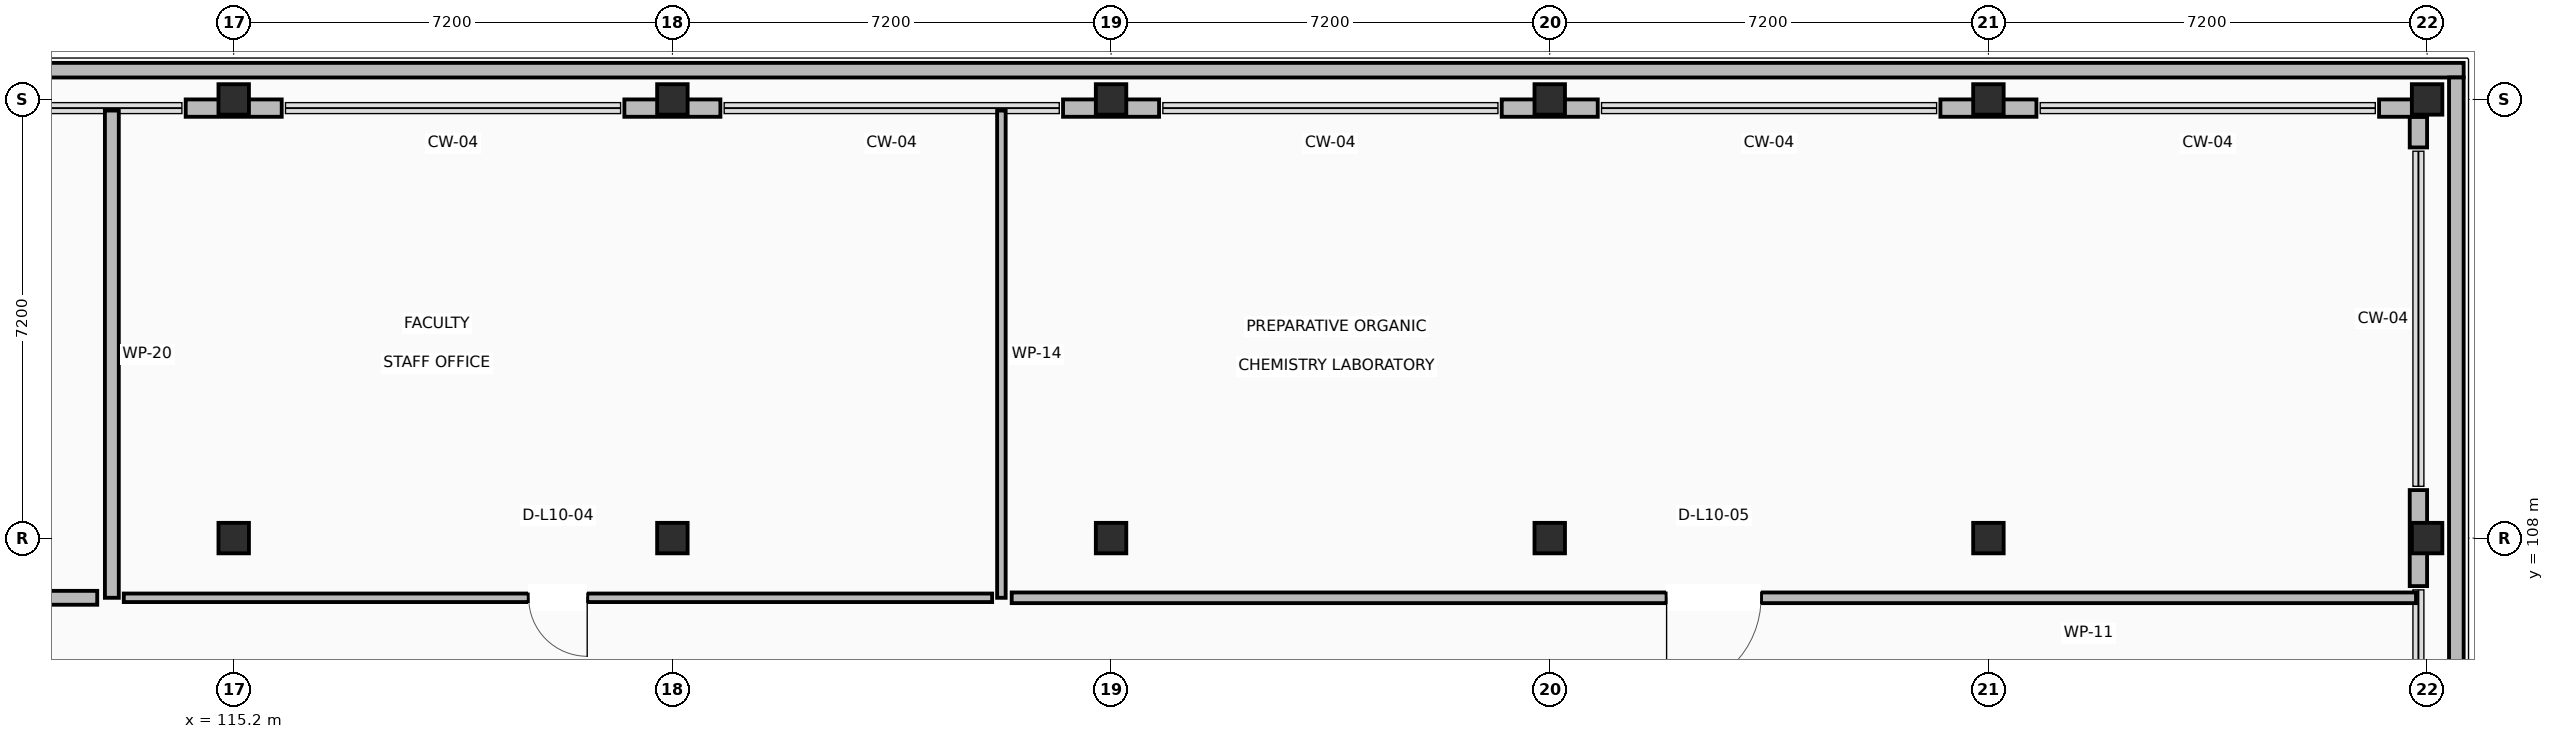
"""IFC4 building model, lengths in metres.
Left out: names, types, materials, properties, quantities, classifications, styles, units other than length and angle.
Written with IfcOpenShell. Run it as: python <this file> out.ifc"""

import sys

from ifc_helpers import new_model, si_unit, direction, frame, frame_2d, origin, origin_2d, place, context, subcontext, project, spatial, rectangle, extrude, element, fill, save


model = new_model("IFC4")
c1 = context("Model", 3, precision=1e-05, world=origin(), true_north=direction((0.0, 1.0)))
c2 = subcontext(c1, "Body", "Model", "MODEL_VIEW")
j1 = project(units=[si_unit("LENGTHUNIT", "METRE"), si_unit("PLANEANGLEUNIT", "RADIAN")], contexts=[c1])
p1 = place(None, origin())
s1 = spatial("IfcSite", under=j1, at=p1, CompositionType="ELEMENT")
p2 = place(p1, origin())
s2 = spatial("IfcBuilding", under=s1, at=p2, CompositionType="ELEMENT")
p3 = place(p2, frame((0.0, 0.0, 43.8)))
s3 = spatial("IfcBuildingStorey", under=s2, at=p3, CompositionType="ELEMENT", Elevation=43.8)
for number, where, z_axis, x_axis in (
    (1, (115.2, 108.0, 0.0), (0.0, 0.0, 1.0), (1.0, 0.0, 0.0)),
    (2, (115.2, 115.2, 0.0), (0.0, 0.0, 1.0), (1.0, 0.0, 0.0)),
    (3, (122.4, 108.0, 0.0), (0.0, 0.0, 1.0), (1.0, 0.0, 0.0)),
    (4, (122.4, 115.2, 0.0), (0.0, 0.0, 1.0), (1.0, 0.0, 0.0)),
    (5, (129.6, 108.0, 0.0), (0.0, 0.0, 1.0), (1.0, 0.0, 0.0)),
    (6, (129.6, 115.2, 0.0), (0.0, 0.0, 1.0), (1.0, 0.0, 0.0)),
    (7, (136.8, 108.0, 0.0), (0.0, 0.0, 1.0), (1.0, 0.0, 0.0)),
    (8, (136.8, 115.2, 0.0), (0.0, 0.0, 1.0), (1.0, 0.0, 0.0)),
    (9, (144.0, 108.0, 0.0), (0.0, 0.0, 1.0), (1.0, 0.0, 0.0)),
    (10, (144.0, 115.2, 0.0), (0.0, 0.0, 1.0), (1.0, 0.0, 0.0)),
    (11, (151.2, 108.0, 0.0), (0.0, 0.0, 1.0), (1.0, 0.0, 0.0)),
    (12, (151.2, 115.2, 0.0), (0.0, 0.0, 1.0), (1.0, 0.0, 0.0)),
):
    element("IfcColumn", number, at=place(p3, frame(where, z_axis=z_axis, x_axis=x_axis)), inside=s3, PredefinedType="COLUMN", context=c2, shape_type="SweptSolid", body=[
        extrude(rectangle(XDim=0.5, YDim=0.5, at=origin_2d()), origin(), (0.0, 0.0, 1.0), 3.92),
    ])
p4 = place(p3, frame((151.058, 107.212, 0.0), z_axis=(0.0, 0.0, 1.0), x_axis=(0.0, 1.0, 0.0)))
e13 = element("IfcWall", 13, at=p4, inside=s3, PredefinedType="STANDARD", context=c2, shape_type="SweptSolid", body=[
    extrude(rectangle(XDim=1.576, YDim=0.285, at=frame_2d((0.788, 0.0))), origin(), (0.0, 0.0, 1.0), 2.96),
])
p5 = place(p3, frame((151.058, 114.412, 0.0), z_axis=(0.0, 0.0, 1.0), x_axis=(0.0, 1.0, 0.0)))
e14 = element("IfcWall", 14, at=p5, inside=s3, PredefinedType="STANDARD", context=c2, shape_type="SweptSolid", body=[
    extrude(rectangle(XDim=0.503, YDim=0.285, at=frame_2d((0.251, 0.0))), origin(), (0.0, 0.0, 1.0), 2.96),
])
p6 = place(p3, frame((151.2, 115.058, 0.0), z_axis=(0.0, 0.0, 1.0), x_axis=(-1.0, 0.0, 0.0)))
e15 = element("IfcWall", 15, at=p6, inside=s3, PredefinedType="STANDARD", context=c2, shape_type="SweptSolid", body=[
    extrude(rectangle(XDim=0.788, YDim=0.285, at=frame_2d((0.394, 0.0))), origin(), (0.0, 0.0, 1.0), 2.96),
])
p7 = place(p3, frame((144.788, 115.058, 0.0), z_axis=(0.0, 0.0, 1.0), x_axis=(-1.0, 0.0, 0.0)))
e16 = element("IfcWall", 16, at=p7, inside=s3, PredefinedType="STANDARD", context=c2, shape_type="SweptSolid", body=[
    extrude(rectangle(XDim=1.576, YDim=0.285, at=frame_2d((0.788, 0.0))), origin(), (0.0, 0.0, 1.0), 2.96),
])
for number, where, z_axis, x_axis in (
    (17, (137.588, 115.058, 0.0), (0.0, 0.0, 1.0), (-1.0, 0.0, 0.0)),
    (18, (130.388, 115.058, 0.0), (0.0, 0.0, 1.0), (-1.0, 0.0, 0.0)),
    (19, (123.188, 115.058, 0.0), (0.0, 0.0, 1.0), (-1.0, 0.0, 0.0)),
    (20, (115.988, 115.058, 0.0), (0.0, 0.0, 1.0), (-1.0, 0.0, 0.0)),
):
    element("IfcWall", number, at=place(p3, frame(where, z_axis=z_axis, x_axis=x_axis)), inside=s3, PredefinedType="STANDARD", context=c2, shape_type="SweptSolid", body=[
        extrude(rectangle(XDim=1.576, YDim=0.285, at=frame_2d((0.788, 0.0))), origin(), (0.0, 0.0, 1.0), 2.96),
    ])
p8 = place(p3, frame((93.0, 115.68, 0.0), z_axis=(0.0, 0.0, 1.0), x_axis=(1.0, 0.0, 0.0)))
e21 = element("IfcWall", 21, at=p8, inside=s3, PredefinedType="PARAPET", context=c2, shape_type="SweptSolid", body=[
    extrude(rectangle(XDim=58.8, YDim=0.24, at=frame_2d((29.4, 0.0))), origin(), (0.0, 0.0, 1.0), 1.12),
])
p9 = place(p3, frame((151.68, 115.56, 0.0), z_axis=(0.0, 0.0, 1.0), x_axis=(0.0, -1.0, 0.0)))
e22 = element("IfcWall", 22, at=p9, inside=s3, PredefinedType="PARAPET", context=c2, shape_type="SweptSolid", body=[
    extrude(rectangle(XDim=21.36, YDim=0.24, at=frame_2d((10.68, 0.0))), origin(), (0.0, 0.0, 1.0), 1.12),
])
p10 = place(p3, frame((113.2, 115.017, 0.0), z_axis=(0.0, 0.0, 1.0), x_axis=(0.0, -1.0, 0.0)))
e23 = element("IfcWall", 23, at=p10, inside=s3, PredefinedType="PARTITIONING", context=c2, shape_type="SweptSolid", body=[
    extrude(rectangle(XDim=7.997, YDim=0.228, at=frame_2d((3.999, 0.0))), origin(), (0.0, 0.0, 1.0), 2.96),
])
p11 = place(p3, frame((112.96, 107.02, 0.0), z_axis=(0.0, 0.0, 1.0), x_axis=(-1.0, 0.0, 0.0)))
e24 = element("IfcWall", 24, at=p11, inside=s3, PredefinedType="PARTITIONING", context=c2, shape_type="SweptSolid", body=[
    extrude(rectangle(XDim=19.177, YDim=0.228, at=frame_2d((9.588, 0.0))), origin(), (0.0, 0.0, 1.0), 2.96),
])
p12 = place(p11, frame((8.913, 0.0, 0.0)))
e25 = element("IfcOpeningElement", 25, at=p12, cuts=e24, PredefinedType="OPENING", context=c2, shape_type="SweptSolid", body=[
    extrude(rectangle(XDim=1.35, YDim=2.15, at=frame_2d((0.675, 1.075))), frame((0.0, 0.124, 0.0), z_axis=(0.0, -1.0, 0.0), x_axis=(1.0, 0.0, 0.0)), (0.0, 0.0, 1.0), 0.248),
])
p13 = place(p3, frame((127.8, 115.017, 0.0), z_axis=(0.0, 0.0, 1.0), x_axis=(0.0, -1.0, 0.0)))
e26 = element("IfcWall", 26, at=p13, inside=s3, PredefinedType="PARTITIONING", context=c2, shape_type="SweptSolid", body=[
    extrude(rectangle(XDim=7.997, YDim=0.14, at=frame_2d((3.999, 0.0))), origin(), (0.0, 0.0, 1.0), 2.96),
])
p14 = place(p3, frame((127.648, 107.02, 0.0), z_axis=(0.0, 0.0, 1.0), x_axis=(-1.0, 0.0, 0.0)))
e27 = element("IfcWall", 27, at=p14, inside=s3, PredefinedType="PARTITIONING", context=c2, shape_type="SweptSolid", body=[
    extrude(rectangle(XDim=14.252, YDim=0.14, at=frame_2d((7.126, 0.0))), origin(), (0.0, 0.0, 1.0), 2.96),
])
p15 = place(p14, frame((6.646, 0.0, 0.0)))
e28 = element("IfcOpeningElement", 28, at=p15, cuts=e27, PredefinedType="OPENING", context=c2, shape_type="SweptSolid", body=[
    extrude(rectangle(XDim=0.96, YDim=2.1, at=frame_2d((0.48, 1.05))), frame((0.0, 0.08, 0.0), z_axis=(0.0, -1.0, 0.0), x_axis=(1.0, 0.0, 0.0)), (0.0, 0.0, 1.0), 0.16),
])
p16 = place(p3, frame((151.018, 107.02, 0.0), z_axis=(0.0, 0.0, 1.0), x_axis=(-1.0, 0.0, 0.0)))
e29 = element("IfcWall", 29, at=p16, inside=s3, PredefinedType="PARTITIONING", context=c2, shape_type="SweptSolid", body=[
    extrude(rectangle(XDim=23.049, YDim=0.175, at=frame_2d((11.524, 0.0))), origin(), (0.0, 0.0, 1.0), 2.96),
])
p17 = place(p16, frame((10.75, 0.0, 0.0)))
e30 = element("IfcOpeningElement", 30, at=p17, cuts=e29, PredefinedType="OPENING", context=c2, shape_type="SweptSolid", body=[
    extrude(rectangle(XDim=1.55, YDim=2.2, at=frame_2d((0.775, 1.1))), frame((0.0, 0.097, 0.0), z_axis=(0.0, -1.0, 0.0), x_axis=(1.0, 0.0, 0.0)), (0.0, 0.0, 1.0), 0.195),
])
p18 = place(p15, origin())
e31 = element("IfcDoor", 31, at=p18, inside=s3, OperationType="SINGLE_SWING_LEFT", PredefinedType="DOOR", context=c2, shape_type="SweptSolid", body=[
    extrude(rectangle(XDim=0.96, YDim=2.1, at=frame_2d((0.48, 1.05))), frame((0.0, 0.025, 0.0), z_axis=(0.0, -1.0, 0.0), x_axis=(1.0, 0.0, 0.0)), (0.0, 0.0, 1.0), 0.05),
])
fill(e28, e31)
p19 = place(p17, origin())
e32 = element("IfcDoor", 32, at=p19, inside=s3, OperationType="SINGLE_SWING_RIGHT", PredefinedType="DOOR", context=c2, shape_type="SweptSolid", body=[
    extrude(rectangle(XDim=1.55, YDim=2.2, at=frame_2d((0.775, 1.1))), frame((0.0, 0.025, 0.0), z_axis=(0.0, -1.0, 0.0), x_axis=(1.0, 0.0, 0.0)), (0.0, 0.0, 1.0), 0.05),
])
fill(e30, e32)
save(model, sys.argv[1])
